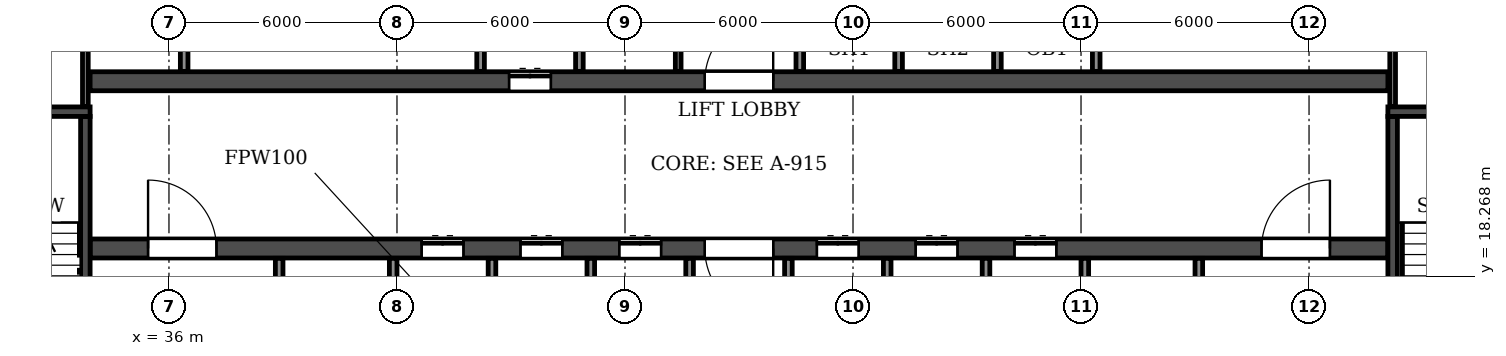
"""IFC4 building model, lengths in metres.
Left out: names, types, materials, properties, quantities, classifications, styles, units other than length and angle.
Written with IfcOpenShell. Run it as: python <this file> out.ifc"""

import sys

from ifc_helpers import new_model, si_unit, direction, frame, frame_2d, origin, place, context, subcontext, project, spatial, rectangle, extrude, element, fill, save


model = new_model("IFC4")
c1 = context("Model", 3, precision=1e-05, world=origin(), true_north=direction((0.0, 1.0)))
c2 = subcontext(c1, "Body", "Model", "MODEL_VIEW")
j1 = project(units=[si_unit("LENGTHUNIT", "METRE"), si_unit("PLANEANGLEUNIT", "RADIAN")], contexts=[c1])
p1 = place(None, origin())
s1 = spatial("IfcSite", under=j1, at=p1, CompositionType="ELEMENT")
p2 = place(p1, origin())
s2 = spatial("IfcBuilding", under=s1, at=p2, CompositionType="ELEMENT")
p3 = place(p2, frame((0.0, 0.0, 72.9)))
s3 = spatial("IfcBuildingStorey", under=s2, at=p3, CompositionType="ELEMENT", Elevation=72.9)
p4 = place(p3, frame((33.925, 19.0, 0.0), z_axis=(0.0, 0.0, 1.0), x_axis=(1.0, 0.0, 0.0)))
e1 = element("IfcWall", 1, at=p4, inside=s3, PredefinedType="SOLIDWALL", context=c2, shape_type="SweptSolid", body=[
    extrude(rectangle(XDim=34.15, YDim=0.5, at=frame_2d((17.075, 0.0))), origin(), (0.0, 0.0, 1.0), 3.06),
])
p5 = place(p4, frame((16.175, 0.0, 0.0)))
e2 = element("IfcOpeningElement", 2, at=p5, cuts=e1, PredefinedType="OPENING", context=c2, shape_type="SweptSolid", body=[
    extrude(rectangle(XDim=1.8, YDim=2.1, at=frame_2d((0.9, 1.05))), frame((0.0, 0.26, 0.0), z_axis=(0.0, -1.0, 0.0), x_axis=(1.0, 0.0, 0.0)), (0.0, 0.0, 1.0), 0.52),
])
p6 = place(p4, frame((1.525, 0.0, 0.0)))
e3 = element("IfcOpeningElement", 3, at=p6, cuts=e1, PredefinedType="OPENING", context=c2, shape_type="SweptSolid", body=[
    extrude(rectangle(XDim=1.8, YDim=2.1, at=frame_2d((0.9, 1.05))), frame((0.0, 0.26, 0.0), z_axis=(0.0, -1.0, 0.0), x_axis=(1.0, 0.0, 0.0)), (0.0, 0.0, 1.0), 0.52),
])
p7 = place(p4, frame((8.725, 0.0, 0.0)))
e4 = element("IfcOpeningElement", 4, at=p7, cuts=e1, PredefinedType="OPENING", context=c2, shape_type="SweptSolid", body=[
    extrude(rectangle(XDim=1.1, YDim=2.1, at=frame_2d((0.55, 1.05))), frame((0.0, 0.26, 0.0), z_axis=(0.0, -1.0, 0.0), x_axis=(1.0, 0.0, 0.0)), (0.0, 0.0, 1.0), 0.52),
])
p8 = place(p4, frame((11.325, 0.0, 0.0)))
e5 = element("IfcOpeningElement", 5, at=p8, cuts=e1, PredefinedType="OPENING", context=c2, shape_type="SweptSolid", body=[
    extrude(rectangle(XDim=1.1, YDim=2.1, at=frame_2d((0.55, 1.05))), frame((0.0, 0.26, 0.0), z_axis=(0.0, -1.0, 0.0), x_axis=(1.0, 0.0, 0.0)), (0.0, 0.0, 1.0), 0.52),
])
p9 = place(p4, frame((13.925, 0.0, 0.0)))
e6 = element("IfcOpeningElement", 6, at=p9, cuts=e1, PredefinedType="OPENING", context=c2, shape_type="SweptSolid", body=[
    extrude(rectangle(XDim=1.1, YDim=2.1, at=frame_2d((0.55, 1.05))), frame((0.0, 0.26, 0.0), z_axis=(0.0, -1.0, 0.0), x_axis=(1.0, 0.0, 0.0)), (0.0, 0.0, 1.0), 0.52),
])
p10 = place(p4, frame((19.125, 0.0, 0.0)))
e7 = element("IfcOpeningElement", 7, at=p10, cuts=e1, PredefinedType="OPENING", context=c2, shape_type="SweptSolid", body=[
    extrude(rectangle(XDim=1.1, YDim=2.1, at=frame_2d((0.55, 1.05))), frame((0.0, 0.26, 0.0), z_axis=(0.0, -1.0, 0.0), x_axis=(1.0, 0.0, 0.0)), (0.0, 0.0, 1.0), 0.52),
])
p11 = place(p4, frame((21.725, 0.0, 0.0)))
e8 = element("IfcOpeningElement", 8, at=p11, cuts=e1, PredefinedType="OPENING", context=c2, shape_type="SweptSolid", body=[
    extrude(rectangle(XDim=1.1, YDim=2.1, at=frame_2d((0.55, 1.05))), frame((0.0, 0.26, 0.0), z_axis=(0.0, -1.0, 0.0), x_axis=(1.0, 0.0, 0.0)), (0.0, 0.0, 1.0), 0.52),
])
p12 = place(p4, frame((24.325, 0.0, 0.0)))
e9 = element("IfcOpeningElement", 9, at=p12, cuts=e1, PredefinedType="OPENING", context=c2, shape_type="SweptSolid", body=[
    extrude(rectangle(XDim=1.1, YDim=2.1, at=frame_2d((0.55, 1.05))), frame((0.0, 0.26, 0.0), z_axis=(0.0, -1.0, 0.0), x_axis=(1.0, 0.0, 0.0)), (0.0, 0.0, 1.0), 0.52),
])
p13 = place(p4, frame((30.825, 0.0, 0.0)))
e10 = element("IfcOpeningElement", 10, at=p13, cuts=e1, PredefinedType="OPENING", context=c2, shape_type="SweptSolid", body=[
    extrude(rectangle(XDim=1.8, YDim=2.1, at=frame_2d((0.9, 1.05))), frame((0.0, 0.26, 0.0), z_axis=(0.0, -1.0, 0.0), x_axis=(1.0, 0.0, 0.0)), (0.0, 0.0, 1.0), 0.52),
])
p14 = place(p3, frame((33.925, 23.4, 0.0), z_axis=(0.0, 0.0, 1.0), x_axis=(1.0, 0.0, 0.0)))
e11 = element("IfcWall", 11, at=p14, inside=s3, PredefinedType="SOLIDWALL", context=c2, shape_type="SweptSolid", body=[
    extrude(rectangle(XDim=34.15, YDim=0.5, at=frame_2d((17.075, 0.0))), origin(), (0.0, 0.0, 1.0), 3.06),
])
p15 = place(p14, frame((16.175, 0.0, 0.0)))
e12 = element("IfcOpeningElement", 12, at=p15, cuts=e11, PredefinedType="OPENING", context=c2, shape_type="SweptSolid", body=[
    extrude(rectangle(XDim=1.8, YDim=2.1, at=frame_2d((0.9, 1.05))), frame((0.0, 0.26, 0.0), z_axis=(0.0, -1.0, 0.0), x_axis=(1.0, 0.0, 0.0)), (0.0, 0.0, 1.0), 0.52),
])
p16 = place(p14, frame((11.025, 0.0, 0.0)))
e13 = element("IfcOpeningElement", 13, at=p16, cuts=e11, PredefinedType="OPENING", context=c2, shape_type="SweptSolid", body=[
    extrude(rectangle(XDim=1.1, YDim=2.1, at=frame_2d((0.55, 1.05))), frame((0.0, 0.26, 0.0), z_axis=(0.0, -1.0, 0.0), x_axis=(1.0, 0.0, 0.0)), (0.0, 0.0, 1.0), 0.52),
])
p17 = place(p3, frame((33.8, 14.85, 0.0), z_axis=(0.0, 0.0, 1.0), x_axis=(0.0, 1.0, 0.0)))
e14 = element("IfcWall", 14, at=p17, inside=s3, PredefinedType="SOLIDWALL", context=c2, shape_type="SweptSolid", body=[
    extrude(rectangle(XDim=7.625, YDim=0.25, at=frame_2d((3.812, 0.0))), origin(), (0.0, 0.0, 1.0), 3.06),
])
p18 = place(p17, frame((0.45, 0.0, 0.0)))
e15 = element("IfcOpeningElement", 15, at=p18, cuts=e14, PredefinedType="OPENING", context=c2, shape_type="SweptSolid", body=[
    extrude(rectangle(XDim=1.0, YDim=2.1, at=frame_2d((0.5, 1.05))), frame((0.0, 0.135, 0.0), z_axis=(0.0, -1.0, 0.0), x_axis=(1.0, 0.0, 0.0)), (0.0, 0.0, 1.0), 0.27),
])
p19 = place(p3, frame((29.875, 22.6, 0.0), z_axis=(0.0, 0.0, 1.0), x_axis=(1.0, 0.0, 0.0)))
e16 = element("IfcWall", 16, at=p19, inside=s3, PredefinedType="SOLIDWALL", context=c2, shape_type="SweptSolid", body=[
    extrude(rectangle(XDim=4.05, YDim=0.25, at=frame_2d((2.025, 0.0))), origin(), (0.0, 0.0, 1.0), 3.06),
])
p20 = place(p3, frame((68.2, 14.85, 0.0), z_axis=(0.0, 0.0, 1.0), x_axis=(0.0, 1.0, 0.0)))
e17 = element("IfcWall", 17, at=p20, inside=s3, PredefinedType="SOLIDWALL", context=c2, shape_type="SweptSolid", body=[
    extrude(rectangle(XDim=7.625, YDim=0.25, at=frame_2d((3.812, 0.0))), origin(), (0.0, 0.0, 1.0), 3.06),
])
p21 = place(p20, frame((0.45, 0.0, 0.0)))
e18 = element("IfcOpeningElement", 18, at=p21, cuts=e17, PredefinedType="OPENING", context=c2, shape_type="SweptSolid", body=[
    extrude(rectangle(XDim=1.0, YDim=2.1, at=frame_2d((0.5, 1.05))), frame((0.0, 0.135, 0.0), z_axis=(0.0, -1.0, 0.0), x_axis=(1.0, 0.0, 0.0)), (0.0, 0.0, 1.0), 0.27),
])
p22 = place(p3, frame((68.075, 22.6, 0.0), z_axis=(0.0, 0.0, 1.0), x_axis=(1.0, 0.0, 0.0)))
e19 = element("IfcWall", 19, at=p22, inside=s3, PredefinedType="SOLIDWALL", context=c2, shape_type="SweptSolid", body=[
    extrude(rectangle(XDim=4.05, YDim=0.25, at=frame_2d((2.025, 0.0))), origin(), (0.0, 0.0, 1.0), 3.06),
])
p23 = place(p3, frame((49.4, 23.66, 0.0), z_axis=(0.0, 0.0, 1.0), x_axis=(0.0, 1.0, 0.0)))
e20 = element("IfcWall", 20, at=p23, inside=s3, PredefinedType="PARTITIONING", context=c2, shape_type="SweptSolid", body=[
    extrude(rectangle(XDim=3.88, YDim=0.15, at=frame_2d((1.94, 0.0))), origin(), (0.0, 0.0, 1.0), 3.06),
])
p24 = place(p3, frame((36.4, 23.66, 0.0), z_axis=(0.0, 0.0, 1.0), x_axis=(0.0, 1.0, 0.0)))
e21 = element("IfcWall", 21, at=p24, inside=s3, PredefinedType="PARTITIONING", context=c2, shape_type="SweptSolid", body=[
    extrude(rectangle(XDim=3.88, YDim=0.2, at=frame_2d((1.94, 0.0))), origin(), (0.0, 0.0, 1.0), 3.06),
])
for number, where, z_axis, x_axis in (
    (22, (33.8, 22.735, 0.0), (0.0, 0.0, 1.0), (0.0, 1.0, 0.0)),
    (23, (68.2, 22.735, 0.0), (0.0, 0.0, 1.0), (0.0, 1.0, 0.0)),
):
    element("IfcWall", number, at=place(p3, frame(where, z_axis=z_axis, x_axis=x_axis)), inside=s3, PredefinedType="PARTITIONING", context=c2, shape_type="SweptSolid", body=[
        extrude(rectangle(XDim=4.805, YDim=0.15, at=frame_2d((2.402, 0.0))), origin(), (0.0, 0.0, 1.0), 3.06),
    ])
p25 = place(p3, frame((38.9, 14.86, 0.0), z_axis=(0.0, 0.0, 1.0), x_axis=(0.0, 1.0, 0.0)))
e24 = element("IfcWall", 24, at=p25, inside=s3, PredefinedType="PARTITIONING", context=c2, shape_type="SweptSolid", body=[
    extrude(rectangle(XDim=3.88, YDim=0.2, at=frame_2d((1.94, 0.0))), origin(), (0.0, 0.0, 1.0), 3.06),
])
p26 = place(p25, frame((1.39, 0.0, 0.0)))
e25 = element("IfcOpeningElement", 25, at=p26, cuts=e24, PredefinedType="OPENING", context=c2, shape_type="SweptSolid", body=[
    extrude(rectangle(XDim=1.1, YDim=2.1, at=frame_2d((0.55, 1.05))), frame((0.0, 0.11, 0.0), z_axis=(0.0, -1.0, 0.0), x_axis=(1.0, 0.0, 0.0)), (0.0, 0.0, 1.0), 0.22),
])
p27 = place(p3, frame((41.9, 14.86, 0.0), z_axis=(0.0, 0.0, 1.0), x_axis=(0.0, 1.0, 0.0)))
e26 = element("IfcWall", 26, at=p27, inside=s3, PredefinedType="PARTITIONING", context=c2, shape_type="SweptSolid", body=[
    extrude(rectangle(XDim=3.88, YDim=0.2, at=frame_2d((1.94, 0.0))), origin(), (0.0, 0.0, 1.0), 3.06),
])
p28 = place(p3, frame((44.2, 23.66, 0.0), z_axis=(0.0, 0.0, 1.0), x_axis=(0.0, 1.0, 0.0)))
e27 = element("IfcWall", 27, at=p28, inside=s3, PredefinedType="PARTITIONING", context=c2, shape_type="SweptSolid", body=[
    extrude(rectangle(XDim=3.88, YDim=0.2, at=frame_2d((1.94, 0.0))), origin(), (0.0, 0.0, 1.0), 3.06),
])
p29 = place(p3, frame((44.5, 16.3, 0.0), z_axis=(0.0, 0.0, 1.0), x_axis=(0.0, 1.0, 0.0)))
e28 = element("IfcWall", 28, at=p29, inside=s3, PredefinedType="PARTITIONING", context=c2, shape_type="SweptSolid", body=[
    extrude(rectangle(XDim=2.44, YDim=0.2, at=frame_2d((1.22, 0.0))), origin(), (0.0, 0.0, 1.0), 3.06),
])
p30 = place(p3, frame((46.8, 23.66, 0.0), z_axis=(0.0, 0.0, 1.0), x_axis=(0.0, 1.0, 0.0)))
e29 = element("IfcWall", 29, at=p30, inside=s3, PredefinedType="PARTITIONING", context=c2, shape_type="SweptSolid", body=[
    extrude(rectangle(XDim=3.88, YDim=0.2, at=frame_2d((1.94, 0.0))), origin(), (0.0, 0.0, 1.0), 3.06),
])
for number, where, z_axis, x_axis in (
    (30, (47.1, 16.3, 0.0), (0.0, 0.0, 1.0), (0.0, 1.0, 0.0)),
    (31, (49.7, 16.3, 0.0), (0.0, 0.0, 1.0), (0.0, 1.0, 0.0)),
    (32, (52.3, 16.3, 0.0), (0.0, 0.0, 1.0), (0.0, 1.0, 0.0)),
):
    element("IfcWall", number, at=place(p3, frame(where, z_axis=z_axis, x_axis=x_axis)), inside=s3, PredefinedType="PARTITIONING", context=c2, shape_type="SweptSolid", body=[
        extrude(rectangle(XDim=2.44, YDim=0.2, at=frame_2d((1.22, 0.0))), origin(), (0.0, 0.0, 1.0), 3.06),
    ])
p31 = place(p3, frame((52.6, 23.66, 0.0), z_axis=(0.0, 0.0, 1.0), x_axis=(0.0, 1.0, 0.0)))
e33 = element("IfcWall", 33, at=p31, inside=s3, PredefinedType="PARTITIONING", context=c2, shape_type="SweptSolid", body=[
    extrude(rectangle(XDim=2.44, YDim=0.2, at=frame_2d((1.22, 0.0))), origin(), (0.0, 0.0, 1.0), 3.06),
])
p32 = place(p3, frame((54.9, 16.3, 0.0), z_axis=(0.0, 0.0, 1.0), x_axis=(0.0, 1.0, 0.0)))
e34 = element("IfcWall", 34, at=p32, inside=s3, PredefinedType="PARTITIONING", context=c2, shape_type="SweptSolid", body=[
    extrude(rectangle(XDim=2.44, YDim=0.2, at=frame_2d((1.22, 0.0))), origin(), (0.0, 0.0, 1.0), 3.06),
])
p33 = place(p3, frame((55.2, 23.66, 0.0), z_axis=(0.0, 0.0, 1.0), x_axis=(0.0, 1.0, 0.0)))
e35 = element("IfcWall", 35, at=p33, inside=s3, PredefinedType="PARTITIONING", context=c2, shape_type="SweptSolid", body=[
    extrude(rectangle(XDim=2.44, YDim=0.2, at=frame_2d((1.22, 0.0))), origin(), (0.0, 0.0, 1.0), 3.06),
])
p34 = place(p3, frame((57.5, 16.3, 0.0), z_axis=(0.0, 0.0, 1.0), x_axis=(0.0, 1.0, 0.0)))
e36 = element("IfcWall", 36, at=p34, inside=s3, PredefinedType="PARTITIONING", context=c2, shape_type="SweptSolid", body=[
    extrude(rectangle(XDim=2.44, YDim=0.2, at=frame_2d((1.22, 0.0))), origin(), (0.0, 0.0, 1.0), 3.06),
])
p35 = place(p3, frame((57.8, 23.66, 0.0), z_axis=(0.0, 0.0, 1.0), x_axis=(0.0, 1.0, 0.0)))
e37 = element("IfcWall", 37, at=p35, inside=s3, PredefinedType="PARTITIONING", context=c2, shape_type="SweptSolid", body=[
    extrude(rectangle(XDim=2.44, YDim=0.2, at=frame_2d((1.22, 0.0))), origin(), (0.0, 0.0, 1.0), 3.06),
])
p36 = place(p3, frame((60.1, 14.86, 0.0), z_axis=(0.0, 0.0, 1.0), x_axis=(0.0, 1.0, 0.0)))
e38 = element("IfcWall", 38, at=p36, inside=s3, PredefinedType="PARTITIONING", context=c2, shape_type="SweptSolid", body=[
    extrude(rectangle(XDim=3.88, YDim=0.2, at=frame_2d((1.94, 0.0))), origin(), (0.0, 0.0, 1.0), 3.06),
])
p37 = place(p3, frame((60.4, 23.66, 0.0), z_axis=(0.0, 0.0, 1.0), x_axis=(0.0, 1.0, 0.0)))
e39 = element("IfcWall", 39, at=p37, inside=s3, PredefinedType="PARTITIONING", context=c2, shape_type="SweptSolid", body=[
    extrude(rectangle(XDim=2.44, YDim=0.2, at=frame_2d((1.22, 0.0))), origin(), (0.0, 0.0, 1.0), 3.06),
])
p38 = place(p3, frame((63.1, 14.86, 0.0), z_axis=(0.0, 0.0, 1.0), x_axis=(0.0, 1.0, 0.0)))
e40 = element("IfcWall", 40, at=p38, inside=s3, PredefinedType="PARTITIONING", context=c2, shape_type="SweptSolid", body=[
    extrude(rectangle(XDim=3.88, YDim=0.2, at=frame_2d((1.94, 0.0))), origin(), (0.0, 0.0, 1.0), 3.06),
])
p39 = place(p38, frame((1.39, 0.0, 0.0)))
e41 = element("IfcOpeningElement", 41, at=p39, cuts=e40, PredefinedType="OPENING", context=c2, shape_type="SweptSolid", body=[
    extrude(rectangle(XDim=1.1, YDim=2.1, at=frame_2d((0.55, 1.05))), frame((0.0, 0.11, 0.0), z_axis=(0.0, -1.0, 0.0), x_axis=(1.0, 0.0, 0.0)), (0.0, 0.0, 1.0), 0.22),
])
p40 = place(p15, origin())
e42 = element("IfcDoor", 42, at=p40, inside=s3, OperationType="DOUBLE_DOOR_SINGLE_SWING", PredefinedType="DOOR", context=c2, shape_type="SweptSolid", body=[
    extrude(rectangle(XDim=1.8, YDim=2.1, at=frame_2d((0.9, 1.05))), frame((0.0, 0.025, 0.0), z_axis=(0.0, -1.0, 0.0), x_axis=(1.0, 0.0, 0.0)), (0.0, 0.0, 1.0), 0.05),
])
fill(e12, e42)
p41 = place(p5, frame((1.8, 0.0, 0.0), z_axis=(0.0, 0.0, 1.0), x_axis=(-1.0, 0.0, 0.0)))
e43 = element("IfcDoor", 43, at=p41, inside=s3, OperationType="DOUBLE_DOOR_SINGLE_SWING", PredefinedType="DOOR", context=c2, shape_type="SweptSolid", body=[
    extrude(rectangle(XDim=1.8, YDim=2.1, at=frame_2d((0.9, 1.05))), frame((0.0, 0.025, 0.0), z_axis=(0.0, -1.0, 0.0), x_axis=(1.0, 0.0, 0.0)), (0.0, 0.0, 1.0), 0.05),
])
fill(e2, e43)
p42 = place(p6, origin())
e44 = element("IfcDoor", 44, at=p42, inside=s3, OperationType="DOUBLE_DOOR_SINGLE_SWING", PredefinedType="DOOR", context=c2, shape_type="SweptSolid", body=[
    extrude(rectangle(XDim=1.8, YDim=2.1, at=frame_2d((0.9, 1.05))), frame((0.0, 0.025, 0.0), z_axis=(0.0, -1.0, 0.0), x_axis=(1.0, 0.0, 0.0)), (0.0, 0.0, 1.0), 0.05),
])
fill(e3, e44)
p43 = place(p7, origin())
e45 = element("IfcDoor", 45, at=p43, inside=s3, OperationType="DOUBLE_DOOR_SLIDING", PredefinedType="DOOR", context=c2, shape_type="SweptSolid", body=[
    extrude(rectangle(XDim=1.1, YDim=2.1, at=frame_2d((0.55, 1.05))), frame((0.0, 0.025, 0.0), z_axis=(0.0, -1.0, 0.0), x_axis=(1.0, 0.0, 0.0)), (0.0, 0.0, 1.0), 0.05),
])
fill(e4, e45)
p44 = place(p16, origin())
e46 = element("IfcDoor", 46, at=p44, inside=s3, OperationType="DOUBLE_DOOR_SLIDING", PredefinedType="DOOR", context=c2, shape_type="SweptSolid", body=[
    extrude(rectangle(XDim=1.1, YDim=2.1, at=frame_2d((0.55, 1.05))), frame((0.0, 0.025, 0.0), z_axis=(0.0, -1.0, 0.0), x_axis=(1.0, 0.0, 0.0)), (0.0, 0.0, 1.0), 0.05),
])
fill(e13, e46)
p45 = place(p8, origin())
e47 = element("IfcDoor", 47, at=p45, inside=s3, OperationType="DOUBLE_DOOR_SLIDING", PredefinedType="DOOR", context=c2, shape_type="SweptSolid", body=[
    extrude(rectangle(XDim=1.1, YDim=2.1, at=frame_2d((0.55, 1.05))), frame((0.0, 0.025, 0.0), z_axis=(0.0, -1.0, 0.0), x_axis=(1.0, 0.0, 0.0)), (0.0, 0.0, 1.0), 0.05),
])
fill(e5, e47)
p46 = place(p9, origin())
e48 = element("IfcDoor", 48, at=p46, inside=s3, OperationType="DOUBLE_DOOR_SLIDING", PredefinedType="DOOR", context=c2, shape_type="SweptSolid", body=[
    extrude(rectangle(XDim=1.1, YDim=2.1, at=frame_2d((0.55, 1.05))), frame((0.0, 0.025, 0.0), z_axis=(0.0, -1.0, 0.0), x_axis=(1.0, 0.0, 0.0)), (0.0, 0.0, 1.0), 0.05),
])
fill(e6, e48)
p47 = place(p10, origin())
e49 = element("IfcDoor", 49, at=p47, inside=s3, OperationType="DOUBLE_DOOR_SLIDING", PredefinedType="DOOR", context=c2, shape_type="SweptSolid", body=[
    extrude(rectangle(XDim=1.1, YDim=2.1, at=frame_2d((0.55, 1.05))), frame((0.0, 0.025, 0.0), z_axis=(0.0, -1.0, 0.0), x_axis=(1.0, 0.0, 0.0)), (0.0, 0.0, 1.0), 0.05),
])
fill(e7, e49)
p48 = place(p11, origin())
e50 = element("IfcDoor", 50, at=p48, inside=s3, OperationType="DOUBLE_DOOR_SLIDING", PredefinedType="DOOR", context=c2, shape_type="SweptSolid", body=[
    extrude(rectangle(XDim=1.1, YDim=2.1, at=frame_2d((0.55, 1.05))), frame((0.0, 0.025, 0.0), z_axis=(0.0, -1.0, 0.0), x_axis=(1.0, 0.0, 0.0)), (0.0, 0.0, 1.0), 0.05),
])
fill(e8, e50)
p49 = place(p12, origin())
e51 = element("IfcDoor", 51, at=p49, inside=s3, OperationType="DOUBLE_DOOR_SLIDING", PredefinedType="DOOR", context=c2, shape_type="SweptSolid", body=[
    extrude(rectangle(XDim=1.1, YDim=2.1, at=frame_2d((0.55, 1.05))), frame((0.0, 0.025, 0.0), z_axis=(0.0, -1.0, 0.0), x_axis=(1.0, 0.0, 0.0)), (0.0, 0.0, 1.0), 0.05),
])
fill(e9, e51)
p50 = place(p13, origin())
e52 = element("IfcDoor", 52, at=p50, inside=s3, OperationType="DOUBLE_DOOR_SINGLE_SWING", PredefinedType="DOOR", context=c2, shape_type="SweptSolid", body=[
    extrude(rectangle(XDim=1.8, YDim=2.1, at=frame_2d((0.9, 1.05))), frame((0.0, 0.025, 0.0), z_axis=(0.0, -1.0, 0.0), x_axis=(1.0, 0.0, 0.0)), (0.0, 0.0, 1.0), 0.05),
])
fill(e10, e52)
save(model, sys.argv[1])
